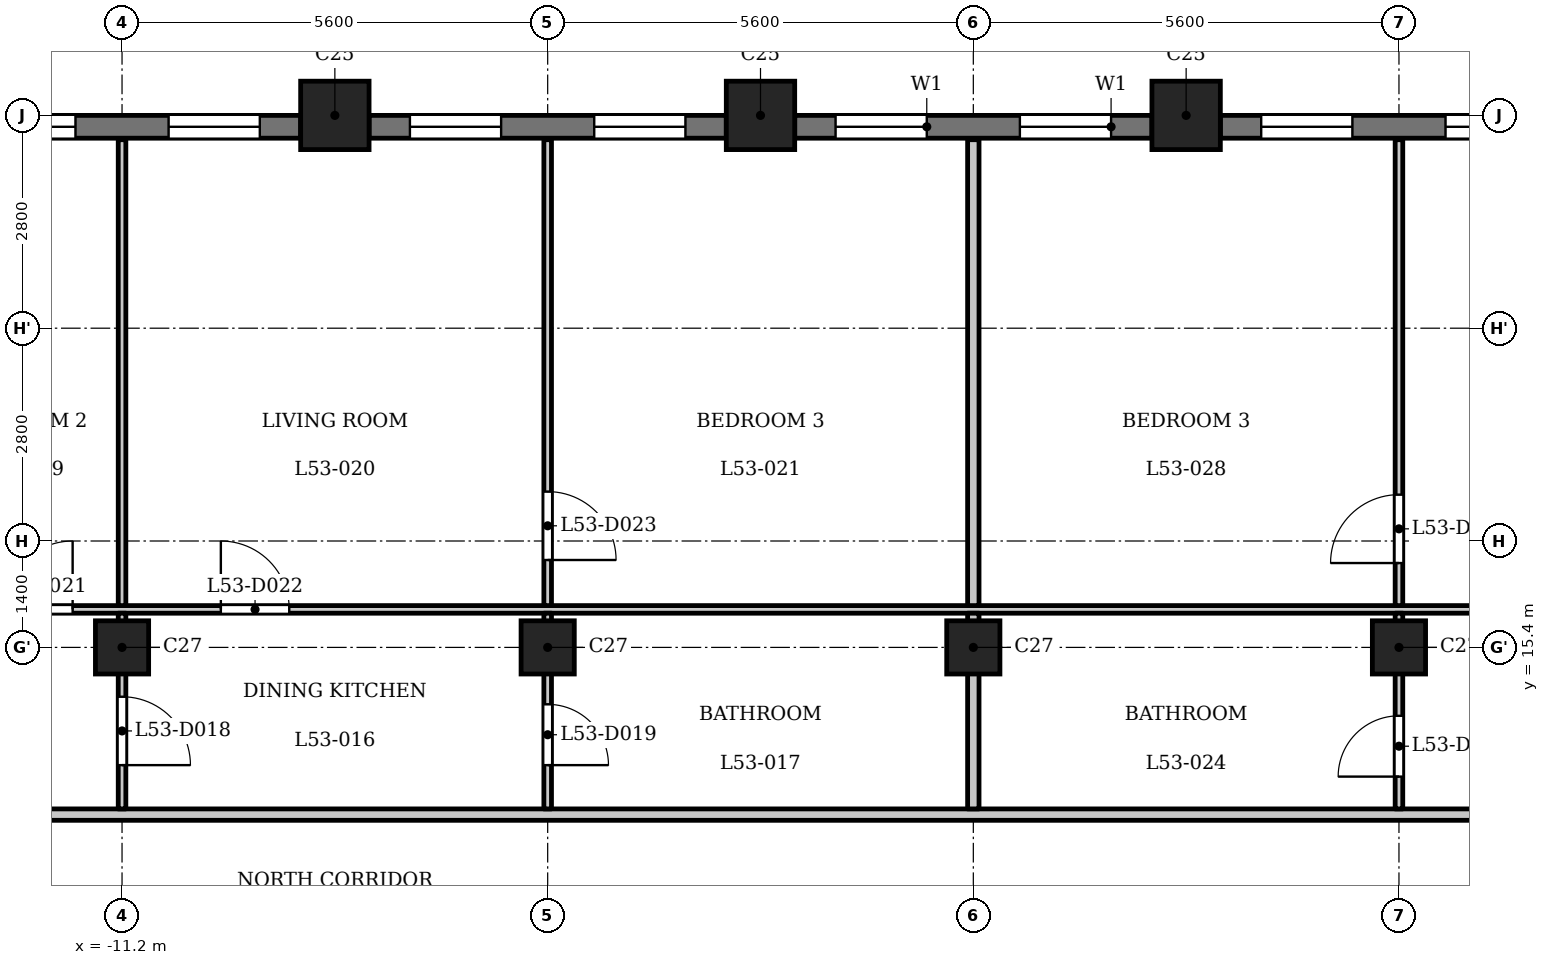
"""IFC4 building model, lengths in metres.
Left out: names, types, materials, properties, quantities, classifications, styles, units other than length and angle.
Written with IfcOpenShell. Run it as: python <this file> out.ifc"""

import sys

from ifc_helpers import new_model, si_unit, direction, frame, frame_2d, origin, origin_2d, place, context, subcontext, project, spatial, rectangle, extrude, element, fill, save


model = new_model("IFC4")
c1 = context("Model", 3, precision=1e-05, world=origin(), true_north=direction((0.0, 1.0)))
c2 = subcontext(c1, "Body", "Model", "MODEL_VIEW")
j1 = project(units=[si_unit("LENGTHUNIT", "METRE"), si_unit("PLANEANGLEUNIT", "RADIAN")], contexts=[c1])
p1 = place(None, origin())
s1 = spatial("IfcSite", under=j1, at=p1, CompositionType="ELEMENT")
p2 = place(p1, origin())
s2 = spatial("IfcBuilding", under=s1, at=p2, CompositionType="ELEMENT")
p3 = place(p2, frame((0.0, 0.0, 206.4)))
s3 = spatial("IfcBuildingStorey", under=s2, at=p3, CompositionType="ELEMENT", Elevation=206.4)
for number, where, z_axis, x_axis in (
    (1, (2.8, 22.4, 0.0), (0.0, 0.0, 1.0), (1.0, 0.0, 0.0)),
    (2, (-2.8, 22.4, 0.0), (0.0, 0.0, 1.0), (1.0, 0.0, 0.0)),
    (3, (-8.4, 22.4, 0.0), (0.0, 0.0, 1.0), (1.0, 0.0, 0.0)),
):
    element("IfcColumn", number, at=place(p3, frame(where, z_axis=z_axis, x_axis=x_axis)), inside=s3, PredefinedType="COLUMN", context=c2, shape_type="SweptSolid", body=[
        extrude(rectangle(XDim=0.9, YDim=0.9, at=origin_2d()), origin(), (0.0, 0.0, 1.0), 3.5),
    ])
for number, where, z_axis, x_axis in (
    (4, (-11.2, 15.4, 0.0), (0.0, 0.0, 1.0), (1.0, 0.0, 0.0)),
    (5, (-5.6, 15.4, 0.0), (0.0, 0.0, 1.0), (1.0, 0.0, 0.0)),
    (6, (0.0, 15.4, 0.0), (0.0, 0.0, 1.0), (1.0, 0.0, 0.0)),
    (7, (5.6, 15.4, 0.0), (0.0, 0.0, 1.0), (1.0, 0.0, 0.0)),
):
    element("IfcColumn", number, at=place(p3, frame(where, z_axis=z_axis, x_axis=x_axis)), inside=s3, PredefinedType="COLUMN", context=c2, shape_type="SweptSolid", body=[
        extrude(rectangle(XDim=0.7, YDim=0.7, at=origin_2d()), origin(), (0.0, 0.0, 1.0), 3.5),
    ])
p4 = place(p3, frame((7.95, 22.25, 0.0), z_axis=(0.0, 0.0, 1.0), x_axis=(-1.0, 0.0, 0.0)))
e8 = element("IfcWall", 8, at=p4, inside=s3, PredefinedType="SOLIDWALL", context=c2, shape_type="SweptSolid", body=[
    extrude(rectangle(XDim=4.7, YDim=0.3, at=frame_2d((2.35, 0.0))), origin(), (0.0, 0.0, 1.0), 2.5),
])
p5 = place(p4, frame((0.538, 0.0, 0.6)))
e9 = element("IfcOpeningElement", 9, at=p5, cuts=e8, PredefinedType="OPENING", context=c2, shape_type="SweptSolid", body=[
    extrude(rectangle(XDim=1.2, YDim=1.55, at=frame_2d((0.6, 0.775))), frame((0.0, 0.16, 0.0), z_axis=(0.0, -1.0, 0.0), x_axis=(1.0, 0.0, 0.0)), (0.0, 0.0, 1.0), 0.32),
])
p6 = place(p4, frame((2.962, 0.0, 0.6)))
e10 = element("IfcOpeningElement", 10, at=p6, cuts=e8, PredefinedType="OPENING", context=c2, shape_type="SweptSolid", body=[
    extrude(rectangle(XDim=1.2, YDim=1.55, at=frame_2d((0.6, 0.775))), frame((0.0, 0.16, 0.0), z_axis=(0.0, -1.0, 0.0), x_axis=(1.0, 0.0, 0.0)), (0.0, 0.0, 1.0), 0.32),
])
p7 = place(p3, frame((2.35, 22.25, 0.0), z_axis=(0.0, 0.0, 1.0), x_axis=(-1.0, 0.0, 0.0)))
e11 = element("IfcWall", 11, at=p7, inside=s3, PredefinedType="SOLIDWALL", context=c2, shape_type="SweptSolid", body=[
    extrude(rectangle(XDim=4.7, YDim=0.3, at=frame_2d((2.35, 0.0))), origin(), (0.0, 0.0, 1.0), 2.5),
])
p8 = place(p7, frame((0.538, 0.0, 0.6)))
e12 = element("IfcOpeningElement", 12, at=p8, cuts=e11, PredefinedType="OPENING", context=c2, shape_type="SweptSolid", body=[
    extrude(rectangle(XDim=1.2, YDim=1.55, at=frame_2d((0.6, 0.775))), frame((0.0, 0.16, 0.0), z_axis=(0.0, -1.0, 0.0), x_axis=(1.0, 0.0, 0.0)), (0.0, 0.0, 1.0), 0.32),
])
p9 = place(p7, frame((2.962, 0.0, 0.6)))
e13 = element("IfcOpeningElement", 13, at=p9, cuts=e11, PredefinedType="OPENING", context=c2, shape_type="SweptSolid", body=[
    extrude(rectangle(XDim=1.2, YDim=1.55, at=frame_2d((0.6, 0.775))), frame((0.0, 0.16, 0.0), z_axis=(0.0, -1.0, 0.0), x_axis=(1.0, 0.0, 0.0)), (0.0, 0.0, 1.0), 0.32),
])
p10 = place(p3, frame((-3.25, 22.25, 0.0), z_axis=(0.0, 0.0, 1.0), x_axis=(-1.0, 0.0, 0.0)))
e14 = element("IfcWall", 14, at=p10, inside=s3, PredefinedType="SOLIDWALL", context=c2, shape_type="SweptSolid", body=[
    extrude(rectangle(XDim=4.7, YDim=0.3, at=frame_2d((2.35, 0.0))), origin(), (0.0, 0.0, 1.0), 2.5),
])
p11 = place(p10, frame((0.538, 0.0, 0.6)))
e15 = element("IfcOpeningElement", 15, at=p11, cuts=e14, PredefinedType="OPENING", context=c2, shape_type="SweptSolid", body=[
    extrude(rectangle(XDim=1.2, YDim=1.55, at=frame_2d((0.6, 0.775))), frame((0.0, 0.16, 0.0), z_axis=(0.0, -1.0, 0.0), x_axis=(1.0, 0.0, 0.0)), (0.0, 0.0, 1.0), 0.32),
])
p12 = place(p10, frame((2.962, 0.0, 0.6)))
e16 = element("IfcOpeningElement", 16, at=p12, cuts=e14, PredefinedType="OPENING", context=c2, shape_type="SweptSolid", body=[
    extrude(rectangle(XDim=1.2, YDim=1.55, at=frame_2d((0.6, 0.775))), frame((0.0, 0.16, 0.0), z_axis=(0.0, -1.0, 0.0), x_axis=(1.0, 0.0, 0.0)), (0.0, 0.0, 1.0), 0.32),
])
p13 = place(p3, frame((-8.85, 22.25, 0.0), z_axis=(0.0, 0.0, 1.0), x_axis=(-1.0, 0.0, 0.0)))
e17 = element("IfcWall", 17, at=p13, inside=s3, PredefinedType="SOLIDWALL", context=c2, shape_type="SweptSolid", body=[
    extrude(rectangle(XDim=4.7, YDim=0.3, at=frame_2d((2.35, 0.0))), origin(), (0.0, 0.0, 1.0), 2.5),
])
p14 = place(p13, frame((0.538, 0.0, 0.6)))
e18 = element("IfcOpeningElement", 18, at=p14, cuts=e17, PredefinedType="OPENING", context=c2, shape_type="SweptSolid", body=[
    extrude(rectangle(XDim=1.2, YDim=1.55, at=frame_2d((0.6, 0.775))), frame((0.0, 0.16, 0.0), z_axis=(0.0, -1.0, 0.0), x_axis=(1.0, 0.0, 0.0)), (0.0, 0.0, 1.0), 0.32),
])
p15 = place(p13, frame((2.962, 0.0, 0.6)))
e19 = element("IfcOpeningElement", 19, at=p15, cuts=e17, PredefinedType="OPENING", context=c2, shape_type="SweptSolid", body=[
    extrude(rectangle(XDim=1.2, YDim=1.55, at=frame_2d((0.6, 0.775))), frame((0.0, 0.16, 0.0), z_axis=(0.0, -1.0, 0.0), x_axis=(1.0, 0.0, 0.0)), (0.0, 0.0, 1.0), 0.32),
])
p16 = place(p3, frame((-17.4, 13.2, 0.0), z_axis=(0.0, 0.0, 1.0), x_axis=(1.0, 0.0, 0.0)))
e20 = element("IfcWall", 20, at=p16, inside=s3, PredefinedType="PARTITIONING", context=c2, shape_type="SweptSolid", body=[
    extrude(rectangle(XDim=34.8, YDim=0.15, at=frame_2d((17.4, 0.0))), origin(), (0.0, 0.0, 1.0), 3.2),
])
p17 = place(p16, frame((0.25, 0.0, 0.0)))
e21 = element("IfcOpeningElement", 21, at=p17, cuts=e20, PredefinedType="OPENING", context=c2, shape_type="SweptSolid", body=[
    extrude(rectangle(XDim=1.0, YDim=2.1, at=frame_2d((0.5, 1.05))), frame((0.0, 0.085, 0.0), z_axis=(0.0, -1.0, 0.0), x_axis=(1.0, 0.0, 0.0)), (0.0, 0.0, 1.0), 0.17),
])
p18 = place(p16, frame((33.65, 0.0, 0.0)))
e22 = element("IfcOpeningElement", 22, at=p18, cuts=e20, PredefinedType="OPENING", context=c2, shape_type="SweptSolid", body=[
    extrude(rectangle(XDim=1.0, YDim=2.1, at=frame_2d((0.5, 1.05))), frame((0.0, 0.085, 0.0), z_axis=(0.0, -1.0, 0.0), x_axis=(1.0, 0.0, 0.0)), (0.0, 0.0, 1.0), 0.17),
])
p19 = place(p3, frame((-16.725, 15.9, 0.0), z_axis=(0.0, 0.0, 1.0), x_axis=(1.0, 0.0, 0.0)))
e23 = element("IfcWall", 23, at=p19, inside=s3, PredefinedType="PARTITIONING", context=c2, shape_type="SweptSolid", body=[
    extrude(rectangle(XDim=33.45, YDim=0.1, at=frame_2d((16.725, 0.0))), origin(), (0.0, 0.0, 1.0), 3.2),
])
p20 = place(p19, frame((1.875, 0.0, 0.0)))
e24 = element("IfcOpeningElement", 24, at=p20, cuts=e23, PredefinedType="OPENING", context=c2, shape_type="SweptSolid", body=[
    extrude(rectangle(XDim=0.9, YDim=2.1, at=frame_2d((0.45, 1.05))), frame((0.0, 0.06, 0.0), z_axis=(0.0, -1.0, 0.0), x_axis=(1.0, 0.0, 0.0)), (0.0, 0.0, 1.0), 0.12),
])
p21 = place(p19, frame((3.975, 0.0, 0.0)))
e25 = element("IfcOpeningElement", 25, at=p21, cuts=e23, PredefinedType="OPENING", context=c2, shape_type="SweptSolid", body=[
    extrude(rectangle(XDim=0.9, YDim=2.1, at=frame_2d((0.45, 1.05))), frame((0.0, 0.06, 0.0), z_axis=(0.0, -1.0, 0.0), x_axis=(1.0, 0.0, 0.0)), (0.0, 0.0, 1.0), 0.12),
])
p22 = place(p19, frame((6.825, 0.0, 0.0)))
e26 = element("IfcOpeningElement", 26, at=p22, cuts=e23, PredefinedType="OPENING", context=c2, shape_type="SweptSolid", body=[
    extrude(rectangle(XDim=0.9, YDim=2.1, at=frame_2d((0.45, 1.05))), frame((0.0, 0.06, 0.0), z_axis=(0.0, -1.0, 0.0), x_axis=(1.0, 0.0, 0.0)), (0.0, 0.0, 1.0), 0.12),
])
p23 = place(p19, frame((28.975, 0.0, 0.0)))
e27 = element("IfcOpeningElement", 27, at=p23, cuts=e23, PredefinedType="OPENING", context=c2, shape_type="SweptSolid", body=[
    extrude(rectangle(XDim=0.9, YDim=2.1, at=frame_2d((0.45, 1.05))), frame((0.0, 0.06, 0.0), z_axis=(0.0, -1.0, 0.0), x_axis=(1.0, 0.0, 0.0)), (0.0, 0.0, 1.0), 0.12),
])
p24 = place(p19, frame((30.725, 0.0, 0.0)))
e28 = element("IfcOpeningElement", 28, at=p24, cuts=e23, PredefinedType="OPENING", context=c2, shape_type="SweptSolid", body=[
    extrude(rectangle(XDim=0.9, YDim=2.1, at=frame_2d((0.45, 1.05))), frame((0.0, 0.06, 0.0), z_axis=(0.0, -1.0, 0.0), x_axis=(1.0, 0.0, 0.0)), (0.0, 0.0, 1.0), 0.12),
])
p25 = place(p19, frame((25.625, 0.0, 0.0)))
e29 = element("IfcOpeningElement", 29, at=p25, cuts=e23, PredefinedType="OPENING", context=c2, shape_type="SweptSolid", body=[
    extrude(rectangle(XDim=0.9, YDim=2.1, at=frame_2d((0.45, 1.05))), frame((0.0, 0.06, 0.0), z_axis=(0.0, -1.0, 0.0), x_axis=(1.0, 0.0, 0.0)), (0.0, 0.0, 1.0), 0.12),
])
p26 = place(p3, frame((-11.2, 13.275, 0.0), z_axis=(0.0, 0.0, 1.0), x_axis=(0.0, 1.0, 0.0)))
e30 = element("IfcWall", 30, at=p26, inside=s3, PredefinedType="PARTITIONING", context=c2, shape_type="SweptSolid", body=[
    extrude(rectangle(XDim=2.575, YDim=0.1, at=frame_2d((1.288, 0.0))), origin(), (0.0, 0.0, 1.0), 3.2),
])
p27 = place(p26, frame((0.576, 0.0, 0.0)))
e31 = element("IfcOpeningElement", 31, at=p27, cuts=e30, PredefinedType="OPENING", context=c2, shape_type="SweptSolid", body=[
    extrude(rectangle(XDim=0.9, YDim=2.1, at=frame_2d((0.45, 1.05))), frame((0.0, 0.06, 0.0), z_axis=(0.0, -1.0, 0.0), x_axis=(1.0, 0.0, 0.0)), (0.0, 0.0, 1.0), 0.12),
])
p28 = place(p3, frame((-11.2, 15.95, 0.0), z_axis=(0.0, 0.0, 1.0), x_axis=(0.0, 1.0, 0.0)))
e32 = element("IfcWall", 32, at=p28, inside=s3, PredefinedType="PARTITIONING", context=c2, shape_type="SweptSolid", body=[
    extrude(rectangle(XDim=6.13, YDim=0.1, at=frame_2d((3.065, 0.0))), origin(), (0.0, 0.0, 1.0), 3.2),
])
p29 = place(p3, frame((-5.6, 13.275, 0.0), z_axis=(0.0, 0.0, 1.0), x_axis=(0.0, 1.0, 0.0)))
e33 = element("IfcWall", 33, at=p29, inside=s3, PredefinedType="PARTITIONING", context=c2, shape_type="SweptSolid", body=[
    extrude(rectangle(XDim=2.575, YDim=0.1, at=frame_2d((1.288, 0.0))), origin(), (0.0, 0.0, 1.0), 3.2),
])
p30 = place(p29, frame((0.576, 0.0, 0.0)))
e34 = element("IfcOpeningElement", 34, at=p30, cuts=e33, PredefinedType="OPENING", context=c2, shape_type="SweptSolid", body=[
    extrude(rectangle(XDim=0.8, YDim=2.1, at=frame_2d((0.4, 1.05))), frame((0.0, 0.06, 0.0), z_axis=(0.0, -1.0, 0.0), x_axis=(1.0, 0.0, 0.0)), (0.0, 0.0, 1.0), 0.12),
])
p31 = place(p3, frame((-5.6, 15.95, 0.0), z_axis=(0.0, 0.0, 1.0), x_axis=(0.0, 1.0, 0.0)))
e35 = element("IfcWall", 35, at=p31, inside=s3, PredefinedType="PARTITIONING", context=c2, shape_type="SweptSolid", body=[
    extrude(rectangle(XDim=6.13, YDim=0.1, at=frame_2d((3.065, 0.0))), origin(), (0.0, 0.0, 1.0), 3.2),
])
p32 = place(p31, frame((0.6, 0.0, 0.0)))
e36 = element("IfcOpeningElement", 36, at=p32, cuts=e35, PredefinedType="OPENING", context=c2, shape_type="SweptSolid", body=[
    extrude(rectangle(XDim=0.9, YDim=2.1, at=frame_2d((0.45, 1.05))), frame((0.0, 0.06, 0.0), z_axis=(0.0, -1.0, 0.0), x_axis=(1.0, 0.0, 0.0)), (0.0, 0.0, 1.0), 0.12),
])
p33 = place(p3, frame((0.0, 13.275, 0.0), z_axis=(0.0, 0.0, 1.0), x_axis=(0.0, 1.0, 0.0)))
e37 = element("IfcWall", 37, at=p33, inside=s3, PredefinedType="PARTITIONING", context=c2, shape_type="SweptSolid", body=[
    extrude(rectangle(XDim=2.575, YDim=0.15, at=frame_2d((1.288, 0.0))), origin(), (0.0, 0.0, 1.0), 3.2),
])
p34 = place(p3, frame((0.0, 15.95, 0.0), z_axis=(0.0, 0.0, 1.0), x_axis=(0.0, 1.0, 0.0)))
e38 = element("IfcWall", 38, at=p34, inside=s3, PredefinedType="PARTITIONING", context=c2, shape_type="SweptSolid", body=[
    extrude(rectangle(XDim=6.13, YDim=0.15, at=frame_2d((3.065, 0.0))), origin(), (0.0, 0.0, 1.0), 3.2),
])
p35 = place(p3, frame((5.6, 13.275, 0.0), z_axis=(0.0, 0.0, 1.0), x_axis=(0.0, 1.0, 0.0)))
e39 = element("IfcWall", 39, at=p35, inside=s3, PredefinedType="PARTITIONING", context=c2, shape_type="SweptSolid", body=[
    extrude(rectangle(XDim=2.575, YDim=0.1, at=frame_2d((1.288, 0.0))), origin(), (0.0, 0.0, 1.0), 3.2),
])
p36 = place(p35, frame((0.425, 0.0, 0.0)))
e40 = element("IfcOpeningElement", 40, at=p36, cuts=e39, PredefinedType="OPENING", context=c2, shape_type="SweptSolid", body=[
    extrude(rectangle(XDim=0.8, YDim=2.1, at=frame_2d((0.4, 1.05))), frame((0.0, 0.06, 0.0), z_axis=(0.0, -1.0, 0.0), x_axis=(1.0, 0.0, 0.0)), (0.0, 0.0, 1.0), 0.12),
])
p37 = place(p3, frame((5.6, 15.95, 0.0), z_axis=(0.0, 0.0, 1.0), x_axis=(0.0, 1.0, 0.0)))
e41 = element("IfcWall", 41, at=p37, inside=s3, PredefinedType="PARTITIONING", context=c2, shape_type="SweptSolid", body=[
    extrude(rectangle(XDim=6.13, YDim=0.1, at=frame_2d((3.065, 0.0))), origin(), (0.0, 0.0, 1.0), 3.2),
])
p38 = place(p37, frame((0.56, 0.0, 0.0)))
e42 = element("IfcOpeningElement", 42, at=p38, cuts=e41, PredefinedType="OPENING", context=c2, shape_type="SweptSolid", body=[
    extrude(rectangle(XDim=0.9, YDim=2.1, at=frame_2d((0.45, 1.05))), frame((0.0, 0.06, 0.0), z_axis=(0.0, -1.0, 0.0), x_axis=(1.0, 0.0, 0.0)), (0.0, 0.0, 1.0), 0.12),
])
p39 = place(p27, origin())
e43 = element("IfcDoor", 43, at=p39, inside=s3, OperationType="SINGLE_SWING_LEFT", PredefinedType="DOOR", context=c2, shape_type="SweptSolid", body=[
    extrude(rectangle(XDim=0.9, YDim=2.1, at=frame_2d((0.45, 1.05))), frame((0.0, 0.025, 0.0), z_axis=(0.0, -1.0, 0.0), x_axis=(1.0, 0.0, 0.0)), (0.0, 0.0, 1.0), 0.05),
])
fill(e31, e43)
p40 = place(p30, origin())
e44 = element("IfcDoor", 44, at=p40, inside=s3, OperationType="SINGLE_SWING_LEFT", PredefinedType="DOOR", context=c2, shape_type="SweptSolid", body=[
    extrude(rectangle(XDim=0.8, YDim=2.1, at=frame_2d((0.4, 1.05))), frame((0.0, 0.025, 0.0), z_axis=(0.0, -1.0, 0.0), x_axis=(1.0, 0.0, 0.0)), (0.0, 0.0, 1.0), 0.05),
])
fill(e34, e44)
p41 = place(p21, origin())
e45 = element("IfcDoor", 45, at=p41, inside=s3, OperationType="SINGLE_SWING_LEFT", PredefinedType="DOOR", context=c2, shape_type="SweptSolid", body=[
    extrude(rectangle(XDim=0.9, YDim=2.1, at=frame_2d((0.45, 1.05))), frame((0.0, 0.025, 0.0), z_axis=(0.0, -1.0, 0.0), x_axis=(1.0, 0.0, 0.0)), (0.0, 0.0, 1.0), 0.05),
])
fill(e25, e45)
p42 = place(p22, origin())
e46 = element("IfcDoor", 46, at=p42, inside=s3, OperationType="SINGLE_SWING_RIGHT", PredefinedType="DOOR", context=c2, shape_type="SweptSolid", body=[
    extrude(rectangle(XDim=0.9, YDim=2.1, at=frame_2d((0.45, 1.05))), frame((0.0, 0.025, 0.0), z_axis=(0.0, -1.0, 0.0), x_axis=(1.0, 0.0, 0.0)), (0.0, 0.0, 1.0), 0.05),
])
fill(e26, e46)
p43 = place(p32, origin())
e47 = element("IfcDoor", 47, at=p43, inside=s3, OperationType="SINGLE_SWING_LEFT", PredefinedType="DOOR", context=c2, shape_type="SweptSolid", body=[
    extrude(rectangle(XDim=0.9, YDim=2.1, at=frame_2d((0.45, 1.05))), frame((0.0, 0.025, 0.0), z_axis=(0.0, -1.0, 0.0), x_axis=(1.0, 0.0, 0.0)), (0.0, 0.0, 1.0), 0.05),
])
fill(e36, e47)
p44 = place(p36, origin())
e48 = element("IfcDoor", 48, at=p44, inside=s3, OperationType="SINGLE_SWING_RIGHT", PredefinedType="DOOR", context=c2, shape_type="SweptSolid", body=[
    extrude(rectangle(XDim=0.8, YDim=2.1, at=frame_2d((0.4, 1.05))), frame((0.0, 0.025, 0.0), z_axis=(0.0, -1.0, 0.0), x_axis=(1.0, 0.0, 0.0)), (0.0, 0.0, 1.0), 0.05),
])
fill(e40, e48)
p45 = place(p38, origin())
e49 = element("IfcDoor", 49, at=p45, inside=s3, OperationType="SINGLE_SWING_RIGHT", PredefinedType="DOOR", context=c2, shape_type="SweptSolid", body=[
    extrude(rectangle(XDim=0.9, YDim=2.1, at=frame_2d((0.45, 1.05))), frame((0.0, 0.025, 0.0), z_axis=(0.0, -1.0, 0.0), x_axis=(1.0, 0.0, 0.0)), (0.0, 0.0, 1.0), 0.05),
])
fill(e42, e49)
p46 = place(p5, origin())
e50 = element("IfcWindow", 50, at=p46, inside=s3, PartitioningType="SINGLE_PANEL", PredefinedType="WINDOW", context=c2, shape_type="SweptSolid", body=[
    extrude(rectangle(XDim=1.2, YDim=1.55, at=frame_2d((0.6, 0.775))), frame((0.0, 0.03, 0.0), z_axis=(0.0, -1.0, 0.0), x_axis=(1.0, 0.0, 0.0)), (0.0, 0.0, 1.0), 0.06),
])
fill(e9, e50)
p47 = place(p6, origin())
e51 = element("IfcWindow", 51, at=p47, inside=s3, PartitioningType="SINGLE_PANEL", PredefinedType="WINDOW", context=c2, shape_type="SweptSolid", body=[
    extrude(rectangle(XDim=1.2, YDim=1.55, at=frame_2d((0.6, 0.775))), frame((0.0, 0.03, 0.0), z_axis=(0.0, -1.0, 0.0), x_axis=(1.0, 0.0, 0.0)), (0.0, 0.0, 1.0), 0.06),
])
fill(e10, e51)
p48 = place(p8, origin())
e52 = element("IfcWindow", 52, at=p48, inside=s3, PartitioningType="SINGLE_PANEL", PredefinedType="WINDOW", context=c2, shape_type="SweptSolid", body=[
    extrude(rectangle(XDim=1.2, YDim=1.55, at=frame_2d((0.6, 0.775))), frame((0.0, 0.03, 0.0), z_axis=(0.0, -1.0, 0.0), x_axis=(1.0, 0.0, 0.0)), (0.0, 0.0, 1.0), 0.06),
])
fill(e12, e52)
p49 = place(p9, origin())
e53 = element("IfcWindow", 53, at=p49, inside=s3, PartitioningType="SINGLE_PANEL", PredefinedType="WINDOW", context=c2, shape_type="SweptSolid", body=[
    extrude(rectangle(XDim=1.2, YDim=1.55, at=frame_2d((0.6, 0.775))), frame((0.0, 0.03, 0.0), z_axis=(0.0, -1.0, 0.0), x_axis=(1.0, 0.0, 0.0)), (0.0, 0.0, 1.0), 0.06),
])
fill(e13, e53)
p50 = place(p11, origin())
e54 = element("IfcWindow", 54, at=p50, inside=s3, PartitioningType="SINGLE_PANEL", PredefinedType="WINDOW", context=c2, shape_type="SweptSolid", body=[
    extrude(rectangle(XDim=1.2, YDim=1.55, at=frame_2d((0.6, 0.775))), frame((0.0, 0.03, 0.0), z_axis=(0.0, -1.0, 0.0), x_axis=(1.0, 0.0, 0.0)), (0.0, 0.0, 1.0), 0.06),
])
fill(e15, e54)
p51 = place(p12, origin())
e55 = element("IfcWindow", 55, at=p51, inside=s3, PartitioningType="SINGLE_PANEL", PredefinedType="WINDOW", context=c2, shape_type="SweptSolid", body=[
    extrude(rectangle(XDim=1.2, YDim=1.55, at=frame_2d((0.6, 0.775))), frame((0.0, 0.03, 0.0), z_axis=(0.0, -1.0, 0.0), x_axis=(1.0, 0.0, 0.0)), (0.0, 0.0, 1.0), 0.06),
])
fill(e16, e55)
p52 = place(p14, origin())
e56 = element("IfcWindow", 56, at=p52, inside=s3, PartitioningType="SINGLE_PANEL", PredefinedType="WINDOW", context=c2, shape_type="SweptSolid", body=[
    extrude(rectangle(XDim=1.2, YDim=1.55, at=frame_2d((0.6, 0.775))), frame((0.0, 0.03, 0.0), z_axis=(0.0, -1.0, 0.0), x_axis=(1.0, 0.0, 0.0)), (0.0, 0.0, 1.0), 0.06),
])
fill(e18, e56)
p53 = place(p15, origin())
e57 = element("IfcWindow", 57, at=p53, inside=s3, PartitioningType="SINGLE_PANEL", PredefinedType="WINDOW", context=c2, shape_type="SweptSolid", body=[
    extrude(rectangle(XDim=1.2, YDim=1.55, at=frame_2d((0.6, 0.775))), frame((0.0, 0.03, 0.0), z_axis=(0.0, -1.0, 0.0), x_axis=(1.0, 0.0, 0.0)), (0.0, 0.0, 1.0), 0.06),
])
fill(e19, e57)
save(model, sys.argv[1])
